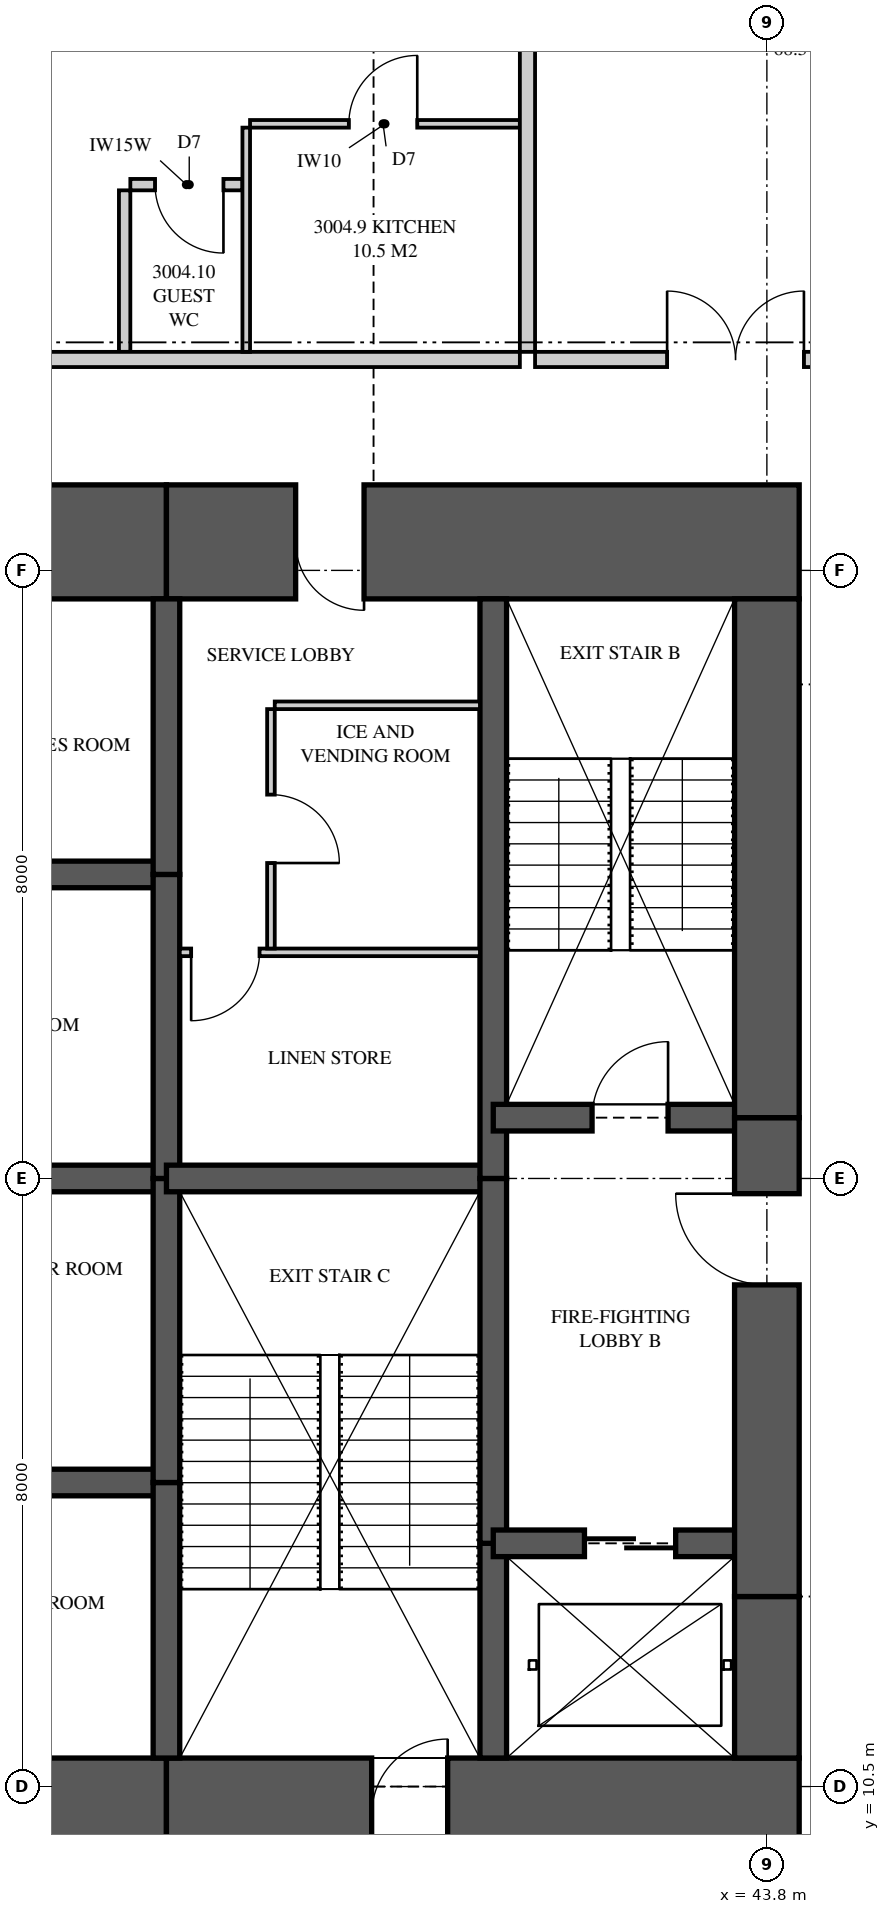
"""IFC4 building model, lengths in metres.
Left out: names, types, materials, properties, quantities, classifications, styles, units other than length and angle.
Written with IfcOpenShell. Run it as: python <this file> out.ifc"""

import sys

from ifc_helpers import new_model, si_unit, direction, frame, frame_2d, origin, place, context, subcontext, project, spatial, polyline, rectangle, outline, extrude, element, fill, save


model = new_model("IFC4")
c1 = context("Model", 3, precision=1e-05, world=origin(), true_north=direction((0.0, 1.0)))
c2 = subcontext(c1, "Body", "Model", "MODEL_VIEW")
j1 = project(units=[si_unit("LENGTHUNIT", "METRE"), si_unit("PLANEANGLEUNIT", "RADIAN")], contexts=[c1])
p1 = place(None, origin())
s1 = spatial("IfcSite", under=j1, at=p1, CompositionType="ELEMENT")
p2 = place(p1, origin())
s2 = spatial("IfcBuilding", under=s1, at=p2, CompositionType="ELEMENT")
p3 = place(p2, frame((0.0, 0.0, 111.55)))
s3 = spatial("IfcBuildingStorey", under=s2, at=p3, CompositionType="ELEMENT", Elevation=111.55)
p4 = place(p3, frame((31.6, 10.125, 0.0), z_axis=(0.0, 0.0, 1.0), x_axis=(1.0, 0.0, 0.0)))
e1 = element("IfcWall", 1, at=p4, inside=s3, PredefinedType="SHEAR", context=c2, shape_type="SweptSolid", body=[
    extrude(rectangle(XDim=4.3, YDim=1.5, at=frame_2d((2.15, 0.0))), origin(), (0.0, 0.0, 1.0), 3.35),
])
p5 = place(p3, frame((35.9, 10.125, 0.0), z_axis=(0.0, 0.0, 1.0), x_axis=(1.0, 0.0, 0.0)))
e2 = element("IfcWall", 2, at=p5, inside=s3, PredefinedType="SHEAR", context=c2, shape_type="SweptSolid", body=[
    extrude(rectangle(XDim=8.325, YDim=1.5, at=frame_2d((4.163, 0.0))), origin(), (0.0, 0.0, 1.0), 3.35),
])
p6 = place(p5, frame((2.7, 0.0, 0.0)))
e3 = element("IfcOpeningElement", 3, at=p6, cuts=e2, PredefinedType="OPENING", context=c2, shape_type="SweptSolid", body=[
    extrude(rectangle(XDim=1.0, YDim=2.1, at=frame_2d((0.5, 1.05))), frame((0.0, 0.76, 0.0), z_axis=(0.0, -1.0, 0.0), x_axis=(1.0, 0.0, 0.0)), (0.0, 0.0, 1.0), 1.52),
])
p7 = place(p3, frame((44.225, 26.875, 0.0), z_axis=(0.0, 0.0, 1.0), x_axis=(-1.0, 0.0, 0.0)))
e4 = element("IfcWall", 4, at=p7, inside=s3, PredefinedType="SHEAR", context=c2, shape_type="SweptSolid", body=[
    extrude(rectangle(XDim=8.325, YDim=1.5, at=frame_2d((4.163, 0.0))), origin(), (0.0, 0.0, 1.0), 3.35),
])
p8 = place(p7, frame((5.725, 0.0, 0.0)))
e5 = element("IfcOpeningElement", 5, at=p8, cuts=e4, PredefinedType="OPENING", context=c2, shape_type="SweptSolid", body=[
    extrude(rectangle(XDim=0.9, YDim=2.1, at=frame_2d((0.45, 1.05))), frame((0.0, 0.76, 0.0), z_axis=(0.0, -1.0, 0.0), x_axis=(1.0, 0.0, 0.0)), (0.0, 0.0, 1.0), 1.52),
])
p9 = place(p3, frame((35.9, 26.875, 0.0), z_axis=(0.0, 0.0, 1.0), x_axis=(-1.0, 0.0, 0.0)))
e6 = element("IfcWall", 6, at=p9, inside=s3, PredefinedType="SHEAR", context=c2, shape_type="SweptSolid", body=[
    extrude(rectangle(XDim=4.3, YDim=1.5, at=frame_2d((2.15, 0.0))), origin(), (0.0, 0.0, 1.0), 3.35),
])
p10 = place(p3, frame((43.8, 10.875, 0.0), z_axis=(0.0, 0.0, 1.0), x_axis=(0.0, 1.0, 0.0)))
e7 = element("IfcWall", 7, at=p10, inside=s3, PredefinedType="SHEAR", context=c2, shape_type="SweptSolid", body=[
    extrude(rectangle(XDim=2.125, YDim=0.85, at=frame_2d((1.062, 0.0))), origin(), (0.0, 0.0, 1.0), 3.35),
])
p11 = place(p3, frame((43.8, 13.0, 0.0), z_axis=(0.0, 0.0, 1.0), x_axis=(0.0, 1.0, 0.0)))
e8 = element("IfcWall", 8, at=p11, inside=s3, PredefinedType="SHEAR", context=c2, shape_type="SweptSolid", body=[
    extrude(rectangle(XDim=6.3, YDim=0.85, at=frame_2d((3.15, 0.0))), origin(), (0.0, 0.0, 1.0), 3.35),
])
p12 = place(p11, frame((4.1, 0.0, 0.0)))
e9 = element("IfcOpeningElement", 9, at=p12, cuts=e8, PredefinedType="OPENING", context=c2, shape_type="SweptSolid", body=[
    extrude(rectangle(XDim=1.2, YDim=2.2, at=frame_2d((0.6, 1.1))), frame((0.0, 0.435, 0.0), z_axis=(0.0, -1.0, 0.0), x_axis=(1.0, 0.0, 0.0)), (0.0, 0.0, 1.0), 0.87),
])
p13 = place(p3, frame((43.8, 19.3, 0.0), z_axis=(0.0, 0.0, 1.0), x_axis=(0.0, 1.0, 0.0)))
e10 = element("IfcWall", 10, at=p13, inside=s3, PredefinedType="SHEAR", context=c2, shape_type="SweptSolid", body=[
    extrude(rectangle(XDim=6.825, YDim=0.85, at=frame_2d((3.413, 0.0))), origin(), (0.0, 0.0, 1.0), 3.35),
])
p14 = place(p3, frame((35.9, 10.875, 0.0), z_axis=(0.0, 0.0, 1.0), x_axis=(0.0, 1.0, 0.0)))
e11 = element("IfcWall", 11, at=p14, inside=s3, PredefinedType="SHEAR", context=c2, shape_type="SweptSolid", body=[
    extrude(rectangle(XDim=3.625, YDim=0.35, at=frame_2d((1.812, 0.0))), origin(), (0.0, 0.0, 1.0), 3.35),
])
for number, where, z_axis, x_axis in (
    (12, (35.9, 14.5, 0.0), (0.0, 0.0, 1.0), (0.0, 1.0, 0.0)),
    (13, (35.9, 18.5, 0.0), (0.0, 0.0, 1.0), (0.0, 1.0, 0.0)),
):
    element("IfcWall", number, at=place(p3, frame(where, z_axis=z_axis, x_axis=x_axis)), inside=s3, PredefinedType="SHEAR", context=c2, shape_type="SweptSolid", body=[
        extrude(rectangle(XDim=4.0, YDim=0.35, at=frame_2d((2.0, 0.0))), origin(), (0.0, 0.0, 1.0), 3.35),
    ])
p15 = place(p3, frame((35.9, 22.5, 0.0), z_axis=(0.0, 0.0, 1.0), x_axis=(0.0, 1.0, 0.0)))
e14 = element("IfcWall", 14, at=p15, inside=s3, PredefinedType="SHEAR", context=c2, shape_type="SweptSolid", body=[
    extrude(rectangle(XDim=3.625, YDim=0.35, at=frame_2d((1.812, 0.0))), origin(), (0.0, 0.0, 1.0), 3.35),
])
p16 = place(p3, frame((40.2, 10.875, 0.0), z_axis=(0.0, 0.0, 1.0), x_axis=(0.0, 1.0, 0.0)))
e15 = element("IfcWall", 15, at=p16, inside=s3, PredefinedType="SHEAR", context=c2, shape_type="SweptSolid", body=[
    extrude(rectangle(XDim=2.825, YDim=0.35, at=frame_2d((1.413, 0.0))), origin(), (0.0, 0.0, 1.0), 3.35),
])
p17 = place(p3, frame((40.2, 13.7, 0.0), z_axis=(0.0, 0.0, 1.0), x_axis=(0.0, 1.0, 0.0)))
e16 = element("IfcWall", 16, at=p17, inside=s3, PredefinedType="SHEAR", context=c2, shape_type="SweptSolid", body=[
    extrude(rectangle(XDim=4.8, YDim=0.35, at=frame_2d((2.4, 0.0))), origin(), (0.0, 0.0, 1.0), 3.35),
])
p18 = place(p3, frame((40.2, 18.5, 0.0), z_axis=(0.0, 0.0, 1.0), x_axis=(0.0, 1.0, 0.0)))
e17 = element("IfcWall", 17, at=p18, inside=s3, PredefinedType="SHEAR", context=c2, shape_type="SweptSolid", body=[
    extrude(rectangle(XDim=7.625, YDim=0.35, at=frame_2d((3.812, 0.0))), origin(), (0.0, 0.0, 1.0), 3.35),
])
for number, where, z_axis, x_axis in (
    (18, (31.6, 14.5, 0.0), (0.0, 0.0, 1.0), (1.0, 0.0, 0.0)),
    (19, (31.6, 18.5, 0.0), (0.0, 0.0, 1.0), (1.0, 0.0, 0.0)),
    (20, (31.6, 22.5, 0.0), (0.0, 0.0, 1.0), (1.0, 0.0, 0.0)),
):
    element("IfcWall", number, at=place(p3, frame(where, z_axis=z_axis, x_axis=x_axis)), inside=s3, PredefinedType="SHEAR", context=c2, shape_type="SweptSolid", body=[
        extrude(rectangle(XDim=4.3, YDim=0.35, at=frame_2d((2.15, 0.0))), origin(), (0.0, 0.0, 1.0), 3.35),
    ])
p19 = place(p3, frame((35.9, 18.5, 0.0), z_axis=(0.0, 0.0, 1.0), x_axis=(1.0, 0.0, 0.0)))
e21 = element("IfcWall", 21, at=p19, inside=s3, PredefinedType="SHEAR", context=c2, shape_type="SweptSolid", body=[
    extrude(rectangle(XDim=4.3, YDim=0.35, at=frame_2d((2.15, 0.0))), origin(), (0.0, 0.0, 1.0), 3.35),
])
p20 = place(p3, frame((40.2, 13.7, 0.0), z_axis=(0.0, 0.0, 1.0), x_axis=(1.0, 0.0, 0.0)))
e22 = element("IfcWall", 22, at=p20, inside=s3, PredefinedType="SHEAR", context=c2, shape_type="SweptSolid", body=[
    extrude(rectangle(XDim=3.6, YDim=0.35, at=frame_2d((1.8, 0.0))), origin(), (0.0, 0.0, 1.0), 3.35),
])
p21 = place(p20, frame((1.2, 0.0, 0.0)))
e23 = element("IfcOpeningElement", 23, at=p21, cuts=e22, PredefinedType="OPENING", context=c2, shape_type="SweptSolid", body=[
    extrude(rectangle(XDim=1.2, YDim=2.1, at=frame_2d((0.6, 1.05))), frame((0.0, 0.185, 0.0), z_axis=(0.0, -1.0, 0.0), x_axis=(1.0, 0.0, 0.0)), (0.0, 0.0, 1.0), 0.37),
])
p22 = place(p3, frame((40.2, 19.3, 0.0), z_axis=(0.0, 0.0, 1.0), x_axis=(1.0, 0.0, 0.0)))
e24 = element("IfcWall", 24, at=p22, inside=s3, PredefinedType="SHEAR", context=c2, shape_type="SweptSolid", body=[
    extrude(rectangle(XDim=3.6, YDim=0.35, at=frame_2d((1.8, 0.0))), origin(), (0.0, 0.0, 1.0), 3.35),
])
p23 = place(p22, frame((1.3, 0.0, 0.0)))
e25 = element("IfcOpeningElement", 25, at=p23, cuts=e24, PredefinedType="OPENING", context=c2, shape_type="SweptSolid", body=[
    extrude(rectangle(XDim=1.0, YDim=2.1, at=frame_2d((0.5, 1.05))), frame((0.0, 0.185, 0.0), z_axis=(0.0, -1.0, 0.0), x_axis=(1.0, 0.0, 0.0)), (0.0, 0.0, 1.0), 0.37),
])
p24 = place(p3, frame((40.65, 37.825, 0.0), z_axis=(0.0, 0.0, 1.0), x_axis=(0.0, -1.0, 0.0)))
e26 = element("IfcWall", 26, at=p24, inside=s3, PredefinedType="PARTITIONING", context=c2, shape_type="SweptSolid", body=[
    extrude(outline(polyline([(0.259, 3.11), (0.0, 3.11), (0.0, 0.0), (0.529, 0.0), (0.529, 0.12), (1.021, 0.12), (1.021, 0.0), (8.45, 0.0), (8.45, 3.11), (3.766, 3.11), (3.766, 2.51), (2.117, 2.51), (2.117, 2.15), (1.021, 2.15), (1.021, 2.03), (0.529, 2.03), (0.529, 2.15), (0.259, 2.15), (0.259, 3.11)])), frame((0.0, 0.1, 0.0), z_axis=(0.0, -1.0, 0.0), x_axis=(1.0, 0.0, 0.0)), (0.0, 0.0, 1.0), 0.2),
])
p25 = place(p3, frame((37.0, 32.375, 0.0), z_axis=(0.0, 0.0, 1.0), x_axis=(1.0, 0.0, 0.0)))
e27 = element("IfcWall", 27, at=p25, inside=s3, PredefinedType="PARTITIONING", context=c2, shape_type="SweptSolid", body=[
    extrude(outline(polyline([(0.0, 0.0), (3.55, 0.0), (3.55, 3.11), (1.912, 3.11), (1.912, 2.541), (1.338, 2.541), (1.338, 3.11), (0.0, 3.11), (0.0, 0.0)])), frame((0.0, 0.05, 0.0), z_axis=(0.0, -1.0, 0.0), x_axis=(1.0, 0.0, 0.0)), (0.0, 0.0, 1.0), 0.1),
])
p26 = place(p25, frame((1.3, 0.0, 0.0)))
e28 = element("IfcOpeningElement", 28, at=p26, cuts=e27, PredefinedType="OPENING", context=c2, shape_type="SweptSolid", body=[
    extrude(rectangle(XDim=0.9, YDim=2.1, at=frame_2d((0.45, 1.05))), frame((0.0, 0.06, 0.0), z_axis=(0.0, -1.0, 0.0), x_axis=(1.0, 0.0, 0.0)), (0.0, 0.0, 1.0), 0.12),
])
p27 = place(p3, frame((36.95, 32.325, 0.0), z_axis=(0.0, 0.0, 1.0), x_axis=(0.0, -1.0, 0.0)))
e29 = element("IfcWall", 29, at=p27, inside=s3, PredefinedType="PARTITIONING", context=c2, shape_type="SweptSolid", body=[
    extrude(rectangle(XDim=2.95, YDim=0.1, at=frame_2d((1.475, 0.0))), origin(), (0.0, 0.0, 1.0), 3.11),
])
p28 = place(p3, frame((35.425, 31.575, 0.0), z_axis=(0.0, 0.0, 1.0), x_axis=(1.0, 0.0, 0.0)))
e30 = element("IfcWall", 30, at=p28, inside=s3, PredefinedType="PLUMBINGWALL", context=c2, shape_type="SweptSolid", body=[
    extrude(rectangle(XDim=1.475, YDim=0.15, at=frame_2d((0.737, 0.0))), origin(), (0.0, 0.0, 1.0), 3.11),
])
p29 = place(p28, frame((0.325, 0.0, 0.0)))
e31 = element("IfcOpeningElement", 31, at=p29, cuts=e30, PredefinedType="OPENING", context=c2, shape_type="SweptSolid", body=[
    extrude(rectangle(XDim=0.9, YDim=2.1, at=frame_2d((0.45, 1.05))), frame((0.0, 0.085, 0.0), z_axis=(0.0, -1.0, 0.0), x_axis=(1.0, 0.0, 0.0)), (0.0, 0.0, 1.0), 0.17),
])
p30 = place(p3, frame((35.35, 31.5, 0.0), z_axis=(0.0, 0.0, 1.0), x_axis=(0.0, -1.0, 0.0)))
e32 = element("IfcWall", 32, at=p30, inside=s3, PredefinedType="PLUMBINGWALL", context=c2, shape_type="SweptSolid", body=[
    extrude(rectangle(XDim=2.125, YDim=0.15, at=frame_2d((1.062, 0.0))), origin(), (0.0, 0.0, 1.0), 3.11),
])
p31 = place(p3, frame((40.75, 29.275, 0.0), z_axis=(0.0, 0.0, 1.0), x_axis=(1.0, 0.0, 0.0)))
e33 = element("IfcWall", 33, at=p31, inside=s3, PredefinedType="PARTITIONING", context=c2, shape_type="SweptSolid", body=[
    extrude(rectangle(XDim=5.275, YDim=0.2, at=frame_2d((2.637, 0.0))), origin(), (0.0, 0.0, 1.0), 3.11),
])
p32 = place(p31, frame((1.738, 0.0, 0.0)))
e34 = element("IfcOpeningElement", 34, at=p32, cuts=e33, PredefinedType="OPENING", context=c2, shape_type="SweptSolid", body=[
    extrude(rectangle(XDim=1.8, YDim=2.1, at=frame_2d((0.9, 1.05))), frame((0.0, 0.11, 0.0), z_axis=(0.0, -1.0, 0.0), x_axis=(1.0, 0.0, 0.0)), (0.0, 0.0, 1.0), 0.22),
])
p33 = place(p3, frame((31.363, 29.275, 0.0), z_axis=(0.0, 0.0, 1.0), x_axis=(1.0, 0.0, 0.0)))
e35 = element("IfcWall", 35, at=p33, inside=s3, PredefinedType="PARTITIONING", context=c2, shape_type="SweptSolid", body=[
    extrude(outline(polyline([(0.0, 0.0), (9.188, 0.0), (9.188, 3.11), (7.6, 3.11), (7.6, 2.541), (6.925, 2.541), (6.925, 3.11), (0.0, 3.11), (0.0, 0.0)])), frame((0.0, 0.1, 0.0), z_axis=(0.0, -1.0, 0.0), x_axis=(1.0, 0.0, 0.0)), (0.0, 0.0, 1.0), 0.2),
])
p34 = place(p3, frame((37.325, 24.725, 0.0), z_axis=(0.0, 0.0, 1.0), x_axis=(1.0, 0.0, 0.0)))
e36 = element("IfcWall", 36, at=p34, inside=s3, PredefinedType="PARTITIONING", context=c2, shape_type="SweptSolid", body=[
    extrude(rectangle(XDim=2.7, YDim=0.1, at=frame_2d((1.35, 0.0))), origin(), (0.0, 0.0, 1.0), 3.11),
])
p35 = place(p3, frame((37.275, 21.525, 0.0), z_axis=(0.0, 0.0, 1.0), x_axis=(0.0, 1.0, 0.0)))
e37 = element("IfcWall", 37, at=p35, inside=s3, PredefinedType="PARTITIONING", context=c2, shape_type="SweptSolid", body=[
    extrude(rectangle(XDim=3.15, YDim=0.1, at=frame_2d((1.575, 0.0))), origin(), (0.0, 0.0, 1.0), 3.11),
])
p36 = place(p35, frame((1.125, 0.0, 0.0)))
e38 = element("IfcOpeningElement", 38, at=p36, cuts=e37, PredefinedType="OPENING", context=c2, shape_type="SweptSolid", body=[
    extrude(rectangle(XDim=0.9, YDim=2.1, at=frame_2d((0.45, 1.05))), frame((0.0, 0.06, 0.0), z_axis=(0.0, -1.0, 0.0), x_axis=(1.0, 0.0, 0.0)), (0.0, 0.0, 1.0), 0.12),
])
p37 = place(p3, frame((36.075, 21.475, 0.0), z_axis=(0.0, 0.0, 1.0), x_axis=(1.0, 0.0, 0.0)))
e39 = element("IfcWall", 39, at=p37, inside=s3, PredefinedType="PARTITIONING", context=c2, shape_type="SweptSolid", body=[
    extrude(rectangle(XDim=3.95, YDim=0.1, at=frame_2d((1.975, 0.0))), origin(), (0.0, 0.0, 1.0), 3.11),
])
p38 = place(p37, frame((0.15, 0.0, 0.0)))
e40 = element("IfcOpeningElement", 40, at=p38, cuts=e39, PredefinedType="OPENING", context=c2, shape_type="SweptSolid", body=[
    extrude(rectangle(XDim=0.9, YDim=2.1, at=frame_2d((0.45, 1.05))), frame((0.0, 0.06, 0.0), z_axis=(0.0, -1.0, 0.0), x_axis=(1.0, 0.0, 0.0)), (0.0, 0.0, 1.0), 0.12),
])
p39 = place(p26, origin())
e41 = element("IfcDoor", 41, at=p39, inside=s3, OperationType="SINGLE_SWING_RIGHT", PredefinedType="DOOR", context=c2, shape_type="SweptSolid", body=[
    extrude(rectangle(XDim=0.9, YDim=2.1, at=frame_2d((0.45, 1.05))), frame((0.0, 0.025, 0.0), z_axis=(0.0, -1.0, 0.0), x_axis=(1.0, 0.0, 0.0)), (0.0, 0.0, 1.0), 0.05),
])
fill(e28, e41)
p40 = place(p29, frame((0.9, 0.0, 0.0), z_axis=(0.0, 0.0, 1.0), x_axis=(-1.0, 0.0, 0.0)))
e42 = element("IfcDoor", 42, at=p40, inside=s3, OperationType="SINGLE_SWING_LEFT", PredefinedType="DOOR", context=c2, shape_type="SweptSolid", body=[
    extrude(rectangle(XDim=0.9, YDim=2.1, at=frame_2d((0.45, 1.05))), frame((0.0, 0.025, 0.0), z_axis=(0.0, -1.0, 0.0), x_axis=(1.0, 0.0, 0.0)), (0.0, 0.0, 1.0), 0.05),
])
fill(e31, e42)
p41 = place(p32, origin())
e43 = element("IfcDoor", 43, at=p41, inside=s3, OperationType="DOUBLE_DOOR_SINGLE_SWING", PredefinedType="DOOR", context=c2, shape_type="SweptSolid", body=[
    extrude(rectangle(XDim=1.8, YDim=2.1, at=frame_2d((0.9, 1.05))), frame((0.0, 0.025, 0.0), z_axis=(0.0, -1.0, 0.0), x_axis=(1.0, 0.0, 0.0)), (0.0, 0.0, 1.0), 0.05),
])
fill(e34, e43)
p42 = place(p36, frame((0.9, 0.0, 0.0), z_axis=(0.0, 0.0, 1.0), x_axis=(-1.0, 0.0, 0.0)))
e44 = element("IfcDoor", 44, at=p42, inside=s3, OperationType="SINGLE_SWING_RIGHT", PredefinedType="DOOR", context=c2, shape_type="SweptSolid", body=[
    extrude(rectangle(XDim=0.9, YDim=2.1, at=frame_2d((0.45, 1.05))), frame((0.0, 0.025, 0.0), z_axis=(0.0, -1.0, 0.0), x_axis=(1.0, 0.0, 0.0)), (0.0, 0.0, 1.0), 0.05),
])
fill(e38, e44)
p43 = place(p38, frame((0.9, 0.0, 0.0), z_axis=(0.0, 0.0, 1.0), x_axis=(-1.0, 0.0, 0.0)))
e45 = element("IfcDoor", 45, at=p43, inside=s3, OperationType="SINGLE_SWING_RIGHT", PredefinedType="DOOR", context=c2, shape_type="SweptSolid", body=[
    extrude(rectangle(XDim=0.9, YDim=2.1, at=frame_2d((0.45, 1.05))), frame((0.0, 0.025, 0.0), z_axis=(0.0, -1.0, 0.0), x_axis=(1.0, 0.0, 0.0)), (0.0, 0.0, 1.0), 0.05),
])
fill(e40, e45)
p44 = place(p23, origin())
e46 = element("IfcDoor", 46, at=p44, inside=s3, OperationType="SINGLE_SWING_RIGHT", PredefinedType="DOOR", context=c2, shape_type="SweptSolid", body=[
    extrude(rectangle(XDim=1.0, YDim=2.1, at=frame_2d((0.5, 1.05))), frame((0.0, 0.025, 0.0), z_axis=(0.0, -1.0, 0.0), x_axis=(1.0, 0.0, 0.0)), (0.0, 0.0, 1.0), 0.05),
])
fill(e25, e46)
p45 = place(p12, origin())
e47 = element("IfcDoor", 47, at=p45, inside=s3, OperationType="SINGLE_SWING_RIGHT", PredefinedType="DOOR", context=c2, shape_type="SweptSolid", body=[
    extrude(rectangle(XDim=1.2, YDim=2.2, at=frame_2d((0.6, 1.1))), frame((0.0, 0.025, 0.0), z_axis=(0.0, -1.0, 0.0), x_axis=(1.0, 0.0, 0.0)), (0.0, 0.0, 1.0), 0.05),
])
fill(e9, e47)
p46 = place(p21, origin())
e48 = element("IfcDoor", 48, at=p46, inside=s3, OperationType="SLIDING_TO_LEFT", PredefinedType="DOOR", context=c2, shape_type="SweptSolid", body=[
    extrude(rectangle(XDim=1.2, YDim=2.1, at=frame_2d((0.6, 1.05))), frame((0.0, 0.025, 0.0), z_axis=(0.0, -1.0, 0.0), x_axis=(1.0, 0.0, 0.0)), (0.0, 0.0, 1.0), 0.05),
])
fill(e23, e48)
p47 = place(p6, origin())
e49 = element("IfcDoor", 49, at=p47, inside=s3, OperationType="SINGLE_SWING_RIGHT", PredefinedType="DOOR", context=c2, shape_type="SweptSolid", body=[
    extrude(rectangle(XDim=1.0, YDim=2.1, at=frame_2d((0.5, 1.05))), frame((0.0, 0.025, 0.0), z_axis=(0.0, -1.0, 0.0), x_axis=(1.0, 0.0, 0.0)), (0.0, 0.0, 1.0), 0.05),
])
fill(e3, e49)
p48 = place(p8, origin())
e50 = element("IfcDoor", 50, at=p48, inside=s3, OperationType="SINGLE_SWING_LEFT", PredefinedType="DOOR", context=c2, shape_type="SweptSolid", body=[
    extrude(rectangle(XDim=0.9, YDim=2.1, at=frame_2d((0.45, 1.05))), frame((0.0, 0.47, 0.0), z_axis=(0.0, -1.0, 0.0), x_axis=(1.0, 0.0, 0.0)), (0.0, 0.0, 1.0), 0.8),
])
fill(e5, e50)
save(model, sys.argv[1])
